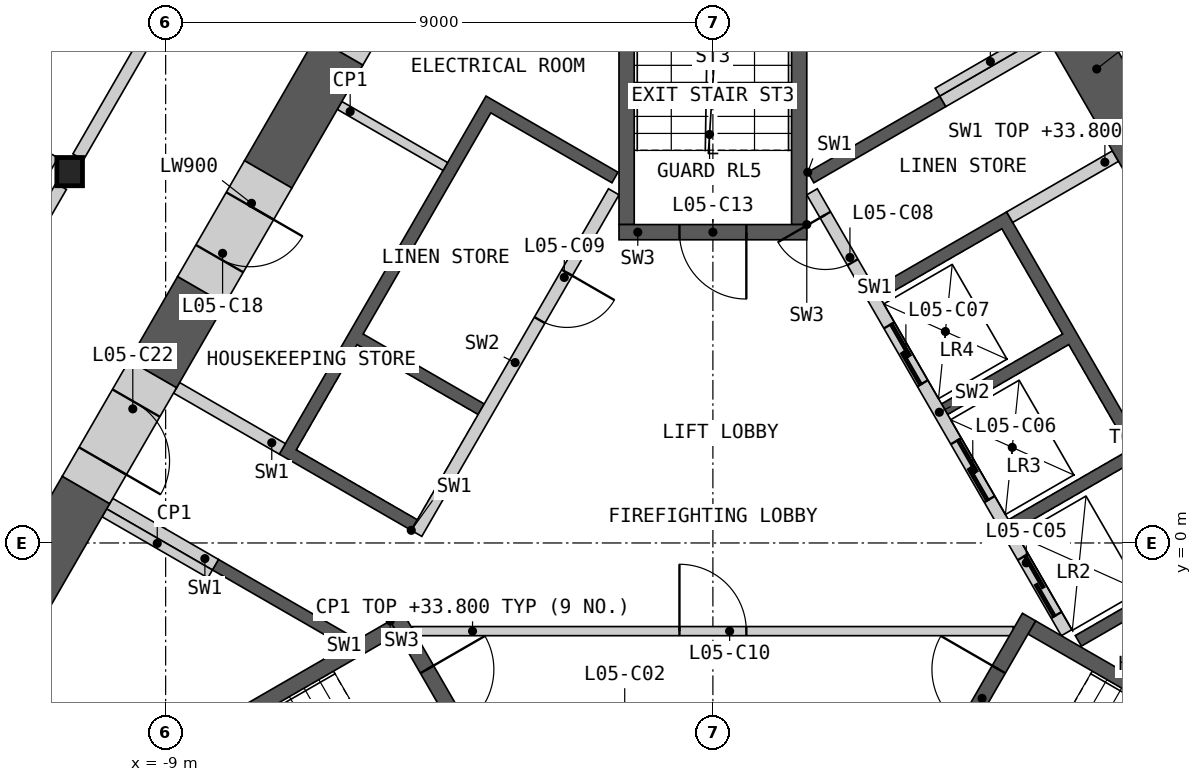
"""IFC4 building model, lengths in metres.
Left out: names, types, materials, properties, quantities, classifications, styles, units other than length and angle.
Written with IfcOpenShell. Run it as: python <this file> out.ifc"""

import sys

from ifc_helpers import new_model, si_unit, direction, frame, frame_2d, origin, origin_2d, place, context, subcontext, project, spatial, polyline, rectangle, i_section, outline, extrude, element, fill, save


model = new_model("IFC4")
c1 = context("Model", 3, precision=1e-05, world=origin(), true_north=direction((0.0, 1.0)))
c2 = subcontext(c1, "Body", "Model", "MODEL_VIEW")
j1 = project(units=[si_unit("LENGTHUNIT", "METRE"), si_unit("PLANEANGLEUNIT", "RADIAN")], contexts=[c1])
p1 = place(None, origin())
s1 = spatial("IfcSite", under=j1, at=p1, CompositionType="ELEMENT")
p2 = place(p1, origin())
s2 = spatial("IfcBuilding", under=s1, at=p2, CompositionType="ELEMENT")
p3 = place(p2, frame((0.0, 0.0, 30.0)))
s3 = spatial("IfcBuildingStorey", under=s2, at=p3, CompositionType="ELEMENT", Elevation=30.0)
p4 = place(p3, frame((-10.578, 6.107, 0.0), z_axis=(0.0, 0.0, 1.0), x_axis=(1.0, 0.0, 0.0)))
e1 = element("IfcColumn", 1, at=p4, inside=s3, PredefinedType="COLUMN", context=c2, shape_type="SweptSolid", body=[
    extrude(i_section(OverallWidth=0.421, OverallDepth=0.465, WebThickness=0.045, FlangeThickness=0.072, at=origin_2d()), origin(), (0.0, 0.0, 1.0), 4.2),
])
p5 = place(p3, origin())
e2 = element("IfcWall", 2, at=p5, inside=s3, PredefinedType="SHEAR", context=c2, shape_type="SweptSolid", body=[
    extrude(outline(polyline([(1.561, 6.097), (3.731, 7.35), (3.831, 7.177), (1.66, 5.924), (1.561, 6.097)])), origin(), (0.0, 0.0, 1.0), 3.8),
])
p6 = place(p3, origin())
e3 = element("IfcWall", 3, at=p6, inside=s3, PredefinedType="SHEAR", context=c2, shape_type="SweptSolid", body=[
    extrude(outline(polyline([(2.66, 4.192), (4.831, 5.445), (8.231, -0.444), (6.061, -1.697), (5.96, -1.524), (7.952, -0.374), (6.952, 1.358), (4.96, 0.208), (4.861, 0.381), (6.852, 1.531), (5.852, 3.263), (3.861, 2.113), (3.76, 2.287), (5.752, 3.437), (4.752, 5.169), (2.76, 4.019), (2.66, 4.192)])), origin(), (0.0, 0.0, 1.0), 3.8),
])
p7 = place(p3, frame((5.817, -1.476, 0.0), z_axis=(0.0, 0.0, 1.0), x_axis=(-0.500002616675, 0.866023893041, 0.0)))
e4 = element("IfcWall", 4, at=p7, inside=s3, PredefinedType="SOLIDWALL", context=c2, shape_type="SweptSolid", body=[
    extrude(rectangle(XDim=8.373, YDim=0.2, at=frame_2d((4.187, 0.0))), origin(), (0.0, 0.0, 1.0), 3.8),
])
p8 = place(p7, frame((0.337, 0.0, 0.0)))
e5 = element("IfcOpeningElement", 5, at=p8, cuts=e4, PredefinedType="OPENING", context=c2, shape_type="SweptSolid", body=[
    extrude(rectangle(XDim=1.1, YDim=2.1, at=frame_2d((0.55, 1.05))), frame((0.0, 0.11, 0.0), z_axis=(0.0, -1.0, 0.0), x_axis=(1.0, 0.0, 0.0)), (0.0, 0.0, 1.0), 0.22),
])
p9 = place(p7, frame((2.537, 0.0, 0.0)))
e6 = element("IfcOpeningElement", 6, at=p9, cuts=e4, PredefinedType="OPENING", context=c2, shape_type="SweptSolid", body=[
    extrude(rectangle(XDim=1.1, YDim=2.1, at=frame_2d((0.55, 1.05))), frame((0.0, 0.11, 0.0), z_axis=(0.0, -1.0, 0.0), x_axis=(1.0, 0.0, 0.0)), (0.0, 0.0, 1.0), 0.22),
])
p10 = place(p7, frame((4.737, 0.0, 0.0)))
e7 = element("IfcOpeningElement", 7, at=p10, cuts=e4, PredefinedType="OPENING", context=c2, shape_type="SweptSolid", body=[
    extrude(rectangle(XDim=1.1, YDim=2.1, at=frame_2d((0.55, 1.05))), frame((0.0, 0.11, 0.0), z_axis=(0.0, -1.0, 0.0), x_axis=(1.0, 0.0, 0.0)), (0.0, 0.0, 1.0), 0.22),
])
p11 = place(p7, frame((7.037, 0.0, 0.0)))
e8 = element("IfcOpeningElement", 8, at=p11, cuts=e4, PredefinedType="OPENING", context=c2, shape_type="SweptSolid", body=[
    extrude(rectangle(XDim=0.9, YDim=2.1, at=frame_2d((0.45, 1.05))), frame((0.0, 0.11, 0.0), z_axis=(0.0, -1.0, 0.0), x_axis=(1.0, 0.0, 0.0)), (0.0, 0.0, 1.0), 0.22),
])
p12 = place(p3, frame((4.881, 5.358, 0.0), z_axis=(0.0, 0.0, 1.0), x_axis=(0.866035824272, 0.499981950752, 0.0)))
e9 = element("IfcWall", 9, at=p12, inside=s3, PredefinedType="SHEAR", context=c2, shape_type="SweptSolid", body=[
    extrude(rectangle(XDim=2.009, YDim=0.2, at=frame_2d((1.004, 0.0))), origin(), (0.0, 0.0, 1.0), 3.8),
])
p13 = place(p3, frame((3.781, 7.263, 0.0), z_axis=(0.0, 0.0, 1.0), x_axis=(0.865983199114, 0.50007309351, 0.0)))
e10 = element("IfcWall", 10, at=p13, inside=s3, PredefinedType="SHEAR", context=c2, shape_type="SweptSolid", body=[
    extrude(rectangle(XDim=2.009, YDim=0.2, at=frame_2d((1.004, 0.0))), origin(), (0.0, 0.0, 1.0), 3.8),
])
p14 = place(p3, origin())
e11 = element("IfcWall", 11, at=p14, inside=s3, PredefinedType="SHEAR", context=c2, shape_type="SweptSolid", body=[
    extrude(outline(polyline([(-6.061, -1.697), (-8.231, -0.444), (-8.131, -0.271), (-5.96, -1.524), (-6.061, -1.697)])), origin(), (0.0, 0.0, 1.0), 3.8),
])
p15 = place(p3, origin())
e12 = element("IfcWall", 12, at=p15, inside=s3, PredefinedType="SHEAR", context=c2, shape_type="SweptSolid", body=[
    extrude(outline(polyline([(-4.96, 0.208), (-7.131, 1.461), (-3.731, 7.35), (-1.561, 6.097), (-1.66, 5.924), (-3.652, 7.074), (-5.752, 3.437), (-3.76, 2.287), (-3.861, 2.113), (-5.852, 3.263), (-6.852, 1.531), (-4.861, 0.381), (-4.96, 0.208)])), origin(), (0.0, 0.0, 1.0), 3.8),
])
p16 = place(p3, frame((-1.631, 5.776, 0.0), z_axis=(0.0, 0.0, 1.0), x_axis=(-0.499992876559, -0.866029516466, 0.0)))
e13 = element("IfcWall", 13, at=p16, inside=s3, PredefinedType="SOLIDWALL", context=c2, shape_type="SweptSolid", body=[
    extrude(rectangle(XDim=6.486, YDim=0.2, at=frame_2d((3.243, 0.0))), origin(), (0.0, 0.0, 1.0), 3.8),
])
p17 = place(p16, frame((1.537, 0.0, 0.0)))
e14 = element("IfcOpeningElement", 14, at=p17, cuts=e13, PredefinedType="OPENING", context=c2, shape_type="SweptSolid", body=[
    extrude(rectangle(XDim=0.9, YDim=2.1, at=frame_2d((0.45, 1.05))), frame((0.0, 0.11, 0.0), z_axis=(0.0, -1.0, 0.0), x_axis=(1.0, 0.0, 0.0)), (0.0, 0.0, 1.0), 0.22),
])
p18 = place(p3, frame((-7.081, 1.548, 0.0), z_axis=(0.0, 0.0, 1.0), x_axis=(-0.865983199114, 0.50007309351, 0.0)))
e15 = element("IfcWall", 15, at=p18, inside=s3, PredefinedType="SHEAR", context=c2, shape_type="SweptSolid", body=[
    extrude(rectangle(XDim=2.009, YDim=0.2, at=frame_2d((1.004, 0.0))), origin(), (0.0, 0.0, 1.0), 3.8),
])
p19 = place(p3, frame((-8.181, -0.357, 0.0), z_axis=(0.0, 0.0, 1.0), x_axis=(-0.866035824272, 0.499981950752, 0.0)))
e16 = element("IfcWall", 16, at=p19, inside=s3, PredefinedType="SHEAR", context=c2, shape_type="SweptSolid", body=[
    extrude(rectangle(XDim=2.009, YDim=0.2, at=frame_2d((1.004, 0.0))), origin(), (0.0, 0.0, 1.0), 3.8),
])
p20 = place(p3, frame((-4.941, -1.45, 0.0), z_axis=(0.0, 0.0, 1.0), x_axis=(1.0, 0.0, 0.0)))
e17 = element("IfcWall", 17, at=p20, inside=s3, PredefinedType="PARTITIONING", context=c2, shape_type="SweptSolid", body=[
    extrude(rectangle(XDim=9.882, YDim=0.15, at=frame_2d((4.941, 0.0))), origin(), (0.0, 0.0, 1.0), 3.8),
])
p21 = place(p20, frame((4.391, 0.0, 0.0)))
e18 = element("IfcOpeningElement", 18, at=p21, cuts=e17, PredefinedType="OPENING", context=c2, shape_type="SweptSolid", body=[
    extrude(rectangle(XDim=1.1, YDim=2.1, at=frame_2d((0.55, 1.05))), frame((0.0, 0.085, 0.0), z_axis=(0.0, -1.0, 0.0), x_axis=(1.0, 0.0, 0.0)), (0.0, 0.0, 1.0), 0.17),
])
p22 = place(p3, origin())
e19 = element("IfcWall", 19, at=p22, inside=s3, PredefinedType="SHEAR", context=c2, shape_type="SweptSolid", body=[
    extrude(outline(polyline([(-5.307, -1.281), (-10.374, -4.206), (-10.032, -4.298), (-5.182, -1.498), (-5.307, -1.281)])), origin(), (0.0, 0.0, 1.0), 3.8),
])
p23 = place(p3, frame((-5.199, -1.219, 0.0), z_axis=(0.0, 0.0, 1.0), x_axis=(0.499982516597, -0.866035497597, 0.0)))
e20 = element("IfcWall", 20, at=p23, inside=s3, PredefinedType="SHEAR", context=c2, shape_type="SweptSolid", body=[
    extrude(rectangle(XDim=3.088, YDim=0.25, at=frame_2d((1.544, 0.0))), origin(), (0.0, 0.0, 1.0), 3.8),
])
p24 = place(p23, frame((0.994, 0.0, 0.0)))
e21 = element("IfcOpeningElement", 21, at=p24, cuts=e20, PredefinedType="OPENING", context=c2, shape_type="SweptSolid", body=[
    extrude(rectangle(XDim=1.1, YDim=2.1, at=frame_2d((0.55, 1.05))), frame((0.0, 0.135, 0.0), z_axis=(0.0, -1.0, 0.0), x_axis=(1.0, 0.0, 0.0)), (0.0, 0.0, 1.0), 0.27),
])
p25 = place(p3, origin())
e22 = element("IfcWall", 22, at=p25, inside=s3, PredefinedType="SHEAR", context=c2, shape_type="SweptSolid", body=[
    extrude(outline(polyline([(10.032, -4.298), (10.374, -4.206), (5.307, -1.281), (5.182, -1.498), (10.032, -4.298)])), origin(), (0.0, 0.0, 1.0), 3.8),
])
p26 = place(p3, frame((3.655, -3.893, 0.0), z_axis=(0.0, 0.0, 1.0), x_axis=(0.499982516597, 0.866035497597, 0.0)))
e23 = element("IfcWall", 23, at=p26, inside=s3, PredefinedType="SHEAR", context=c2, shape_type="SweptSolid", body=[
    extrude(rectangle(XDim=3.088, YDim=0.25, at=frame_2d((1.544, 0.0))), origin(), (0.0, 0.0, 1.0), 3.8),
])
p27 = place(p26, frame((0.994, 0.0, 0.0)))
e24 = element("IfcOpeningElement", 24, at=p27, cuts=e23, PredefinedType="OPENING", context=c2, shape_type="SweptSolid", body=[
    extrude(rectangle(XDim=1.1, YDim=2.1, at=frame_2d((0.55, 1.05))), frame((0.0, 0.135, 0.0), z_axis=(0.0, -1.0, 0.0), x_axis=(1.0, 0.0, 0.0)), (0.0, 0.0, 1.0), 0.27),
])
p28 = place(p3, origin())
e25 = element("IfcWall", 25, at=p28, inside=s3, PredefinedType="SHEAR", context=c2, shape_type="SweptSolid", body=[
    extrude(outline(polyline([(1.544, 5.237), (1.544, 11.087), (1.294, 10.837), (1.294, 5.237), (1.544, 5.237)])), origin(), (0.0, 0.0, 1.0), 3.8),
])
p29 = place(p3, origin())
e26 = element("IfcWall", 26, at=p29, inside=s3, PredefinedType="SHEAR", context=c2, shape_type="SweptSolid", body=[
    extrude(outline(polyline([(-1.294, 10.837), (-1.544, 11.087), (-1.544, 5.237), (-1.294, 5.237), (-1.294, 10.837)])), origin(), (0.0, 0.0, 1.0), 3.8),
])
p30 = place(p3, frame((1.544, 5.112, 0.0), z_axis=(0.0, 0.0, 1.0), x_axis=(-1.0, 0.0, 0.0)))
e27 = element("IfcWall", 27, at=p30, inside=s3, PredefinedType="SHEAR", context=c2, shape_type="SweptSolid", body=[
    extrude(rectangle(XDim=3.088, YDim=0.25, at=frame_2d((1.544, 0.0))), origin(), (0.0, 0.0, 1.0), 3.8),
])
p31 = place(p30, frame((0.994, 0.0, 0.0)))
e28 = element("IfcOpeningElement", 28, at=p31, cuts=e27, PredefinedType="OPENING", context=c2, shape_type="SweptSolid", body=[
    extrude(rectangle(XDim=1.1, YDim=2.1, at=frame_2d((0.55, 1.05))), frame((0.0, 0.135, 0.0), z_axis=(0.0, -1.0, 0.0), x_axis=(1.0, 0.0, 0.0)), (0.0, 0.0, 1.0), 0.27),
])
for number, where, z_axis, x_axis in (
    (29, (3.693, 7.415, 0.0), (0.0, 0.0, 1.0), (0.866, 0.5, 0.0)),
    (30, (-8.268, -0.509, 0.0), (0.0, 0.0, 1.0), (-0.866, 0.5, 0.0)),
    (31, (-6.139, 7.196, 0.0), (0.0, 0.0, 1.0), (0.866, -0.5, 0.0)),
):
    element("IfcWall", number, at=place(p3, frame(where, z_axis=z_axis, x_axis=x_axis)), inside=s3, PredefinedType="PARTITIONING", context=c2, shape_type="SweptSolid", body=[
        extrude(rectangle(XDim=2.009, YDim=0.15, at=frame_2d((1.004, 0.0))), origin(), (0.0, 0.0, 1.0), 3.8),
    ])
p32 = place(p3, frame((8.16, 4.596, 0.0), z_axis=(0.0, 0.0, 1.0), x_axis=(-0.500012259336, 0.866018325738, 0.0)))
e32 = element("IfcWall", 32, at=p32, inside=s3, PredefinedType="SHEAR", context=c2, shape_type="SweptSolid", body=[
    extrude(rectangle(XDim=7.389, YDim=0.9, at=frame_2d((3.695, 0.0))), origin(), (0.0, 0.0, 1.0), 3.8),
])
p33 = place(p3, frame((-10.31, 0.872, 0.0), z_axis=(0.0, 0.0, 1.0), x_axis=(-0.499946751862, -0.866056144429, 0.0)))
e33 = element("IfcWall", 33, at=p33, inside=s3, PredefinedType="SHEAR", context=c2, shape_type="SweptSolid", body=[
    extrude(rectangle(XDim=2.889, YDim=0.9, at=frame_2d((1.445, 0.0))), origin(), (0.0, 0.0, 1.0), 3.8),
])
p34 = place(p3, frame((-6.145, 8.086, 0.0), z_axis=(0.0, 0.0, 1.0), x_axis=(-0.500026924946, -0.866009858102, 0.0)))
e34 = element("IfcWall", 34, at=p34, inside=s3, PredefinedType="SHEAR", context=c2, shape_type="SweptSolid", body=[
    extrude(rectangle(XDim=2.337, YDim=0.9, at=frame_2d((1.168, 0.0))), origin(), (0.0, 0.0, 1.0), 3.8),
])
p35 = place(p3, frame((-8.413, 4.157, 0.0), z_axis=(0.0, 0.0, 1.0), x_axis=(-0.499961121316, -0.86604784924, 0.0)))
e35 = element("IfcWall", 35, at=p35, inside=s3, PredefinedType="SHEAR", context=c2, shape_type="SweptSolid", body=[
    extrude(rectangle(XDim=1.594, YDim=0.9, at=frame_2d((0.797, 0.0))), origin(), (0.0, 0.0, 1.0), 3.8),
])
p36 = place(p3, frame((-7.313, 6.062, 0.0), z_axis=(0.0, 0.0, 1.0), x_axis=(-0.500077893725, -0.86598042715, 0.0)))
e36 = element("IfcWall", 36, at=p36, inside=s3, PredefinedType="SHEAR", context=c2, shape_type="SweptSolid", body=[
    extrude(rectangle(XDim=2.2, YDim=0.9, at=frame_2d((1.1, 0.0))), origin(), (0.0, 0.0, 1.0), 3.8),
])
p37 = place(p36, frame((0.6, 0.0, 0.0)))
e37 = element("IfcOpeningElement", 37, at=p37, cuts=e36, PredefinedType="OPENING", context=c2, shape_type="SweptSolid", body=[
    extrude(rectangle(XDim=1.0, YDim=2.1, at=frame_2d((0.5, 1.05))), frame((0.0, 0.46, 0.0), z_axis=(0.0, -1.0, 0.0), x_axis=(1.0, 0.0, 0.0)), (0.0, 0.0, 1.0), 0.92),
])
p38 = place(p3, frame((-5.045, 9.992, 0.0), z_axis=(0.0, 0.0, 1.0), x_axis=(-0.499898558967, -0.866083962871, 0.0)))
e38 = element("IfcWall", 38, at=p38, inside=s3, PredefinedType="SHEAR", context=c2, shape_type="SweptSolid", body=[
    extrude(rectangle(XDim=2.2, YDim=0.9, at=frame_2d((1.1, 0.0))), origin(), (0.0, 0.0, 1.0), 3.8),
])
p39 = place(p38, frame((0.6, 0.0, 0.0)))
e39 = element("IfcOpeningElement", 39, at=p39, cuts=e38, PredefinedType="OPENING", context=c2, shape_type="SweptSolid", body=[
    extrude(rectangle(XDim=1.0, YDim=2.1, at=frame_2d((0.5, 1.05))), frame((0.0, 0.46, 0.0), z_axis=(0.0, -1.0, 0.0), x_axis=(1.0, 0.0, 0.0)), (0.0, 0.0, 1.0), 0.92),
])
p40 = place(p3, frame((-9.21, 2.777, 0.0), z_axis=(0.0, 0.0, 1.0), x_axis=(-0.500077893725, -0.86598042715, 0.0)))
e40 = element("IfcWall", 40, at=p40, inside=s3, PredefinedType="SHEAR", context=c2, shape_type="SweptSolid", body=[
    extrude(rectangle(XDim=2.2, YDim=0.9, at=frame_2d((1.1, 0.0))), origin(), (0.0, 0.0, 1.0), 3.8),
])
p41 = place(p40, frame((0.55, 0.0, 0.0)))
e41 = element("IfcOpeningElement", 41, at=p41, cuts=e40, PredefinedType="OPENING", context=c2, shape_type="SweptSolid", body=[
    extrude(rectangle(XDim=1.1, YDim=2.1, at=frame_2d((0.55, 1.05))), frame((0.0, 0.46, 0.0), z_axis=(0.0, -1.0, 0.0), x_axis=(1.0, 0.0, 0.0)), (0.0, 0.0, 1.0), 0.92),
])
p42 = place(p3, frame((5.429, 15.026, 0.0), z_axis=(0.0, 0.0, 1.0), x_axis=(0.50001002959, -0.86601961312, 0.0)))
e42 = element("IfcWall", 42, at=p42, inside=s3, PredefinedType="PARTITIONING", context=c2, shape_type="SweptSolid", body=[
    extrude(rectangle(XDim=10.019, YDim=0.2, at=frame_2d((5.009, 0.0))), origin(), (0.0, 0.0, 1.0), 3.8),
])
p43 = place(p42, frame((7.266, 0.0, 0.0)))
e43 = element("IfcOpeningElement", 43, at=p43, cuts=e42, PredefinedType="OPENING", context=c2, shape_type="SweptSolid", body=[
    extrude(rectangle(XDim=1.0, YDim=2.1, at=frame_2d((0.5, 1.05))), frame((0.0, 0.11, 0.0), z_axis=(0.0, -1.0, 0.0), x_axis=(1.0, 0.0, 0.0)), (0.0, 0.0, 1.0), 0.22),
])
p44 = place(p42, frame((2.254, 0.0, 0.0)))
e44 = element("IfcOpeningElement", 44, at=p44, cuts=e42, PredefinedType="OPENING", context=c2, shape_type="SweptSolid", body=[
    extrude(rectangle(XDim=1.0, YDim=2.1, at=frame_2d((0.5, 1.05))), frame((0.0, 0.11, 0.0), z_axis=(0.0, -1.0, 0.0), x_axis=(1.0, 0.0, 0.0)), (0.0, 0.0, 1.0), 0.22),
])
p45 = place(p3, frame((-10.439, 6.35, 0.0), z_axis=(0.0, 0.0, 1.0), x_axis=(0.50001002959, 0.86601961312, 0.0)))
e45 = element("IfcWall", 45, at=p45, inside=s3, PredefinedType="PARTITIONING", context=c2, shape_type="SweptSolid", body=[
    extrude(rectangle(XDim=10.019, YDim=0.2, at=frame_2d((5.009, 0.0))), origin(), (0.0, 0.0, 1.0), 3.8),
])
p46 = place(p45, frame((4.16, 0.0, 0.0)))
e46 = element("IfcOpeningElement", 46, at=p46, cuts=e45, PredefinedType="OPENING", context=c2, shape_type="SweptSolid", body=[
    extrude(rectangle(XDim=1.8, YDim=2.1, at=frame_2d((0.9, 1.05))), frame((0.0, 0.11, 0.0), z_axis=(0.0, -1.0, 0.0), x_axis=(1.0, 0.0, 0.0)), (0.0, 0.0, 1.0), 0.22),
])
p47 = place(p3, frame((-15.728, -2.811, 0.0), z_axis=(0.0, 0.0, 1.0), x_axis=(0.49999175339, 0.866030164915, 0.0)))
e47 = element("IfcWall", 47, at=p47, inside=s3, PredefinedType="PARTITIONING", context=c2, shape_type="SweptSolid", body=[
    extrude(rectangle(XDim=10.019, YDim=0.2, at=frame_2d((5.009, 0.0))), origin(), (0.0, 0.0, 1.0), 3.8),
])
p48 = place(p47, frame((4.484, 0.0, 0.0)))
e48 = element("IfcOpeningElement", 48, at=p48, cuts=e47, PredefinedType="OPENING", context=c2, shape_type="SweptSolid", body=[
    extrude(rectangle(XDim=0.95, YDim=2.1, at=frame_2d((0.475, 1.05))), frame((0.0, 0.11, 0.0), z_axis=(0.0, -1.0, 0.0), x_axis=(1.0, 0.0, 0.0)), (0.0, 0.0, 1.0), 0.22),
])
p49 = place(p3, frame((-21.947, 12.671, 0.0), z_axis=(0.0, 0.0, 1.0), x_axis=(0.866026729935, -0.499997703033, 0.0)))
e49 = element("IfcWall", 49, at=p49, inside=s3, PredefinedType="PARTITIONING", context=c2, shape_type="SweptSolid", body=[
    extrude(rectangle(XDim=12.848, YDim=0.2, at=frame_2d((6.424, 0.0))), origin(), (0.0, 0.0, 1.0), 2.885),
])
p50 = place(p8, origin())
e50 = element("IfcDoor", 50, at=p50, inside=s3, OperationType="SLIDING_TO_LEFT", PredefinedType="DOOR", context=c2, shape_type="SweptSolid", body=[
    extrude(rectangle(XDim=1.1, YDim=2.1, at=frame_2d((0.55, 1.05))), frame((0.0, 0.025, 0.0), z_axis=(0.0, -1.0, 0.0), x_axis=(1.0, 0.0, 0.0)), (0.0, 0.0, 1.0), 0.05),
])
fill(e5, e50)
p51 = place(p9, origin())
e51 = element("IfcDoor", 51, at=p51, inside=s3, OperationType="SLIDING_TO_LEFT", PredefinedType="DOOR", context=c2, shape_type="SweptSolid", body=[
    extrude(rectangle(XDim=1.1, YDim=2.1, at=frame_2d((0.55, 1.05))), frame((0.0, 0.025, 0.0), z_axis=(0.0, -1.0, 0.0), x_axis=(1.0, 0.0, 0.0)), (0.0, 0.0, 1.0), 0.05),
])
fill(e6, e51)
p52 = place(p10, origin())
e52 = element("IfcDoor", 52, at=p52, inside=s3, OperationType="SLIDING_TO_LEFT", PredefinedType="DOOR", context=c2, shape_type="SweptSolid", body=[
    extrude(rectangle(XDim=1.1, YDim=2.1, at=frame_2d((0.55, 1.05))), frame((0.0, 0.025, 0.0), z_axis=(0.0, -1.0, 0.0), x_axis=(1.0, 0.0, 0.0)), (0.0, 0.0, 1.0), 0.05),
])
fill(e7, e52)
p53 = place(p11, origin())
e53 = element("IfcDoor", 53, at=p53, inside=s3, OperationType="SINGLE_SWING_RIGHT", PredefinedType="DOOR", context=c2, shape_type="SweptSolid", body=[
    extrude(rectangle(XDim=0.9, YDim=2.1, at=frame_2d((0.45, 1.05))), frame((0.0, 0.025, 0.0), z_axis=(0.0, -1.0, 0.0), x_axis=(1.0, 0.0, 0.0)), (0.0, 0.0, 1.0), 0.05),
])
fill(e8, e53)
p54 = place(p17, origin())
e54 = element("IfcDoor", 54, at=p54, inside=s3, OperationType="SINGLE_SWING_LEFT", PredefinedType="DOOR", context=c2, shape_type="SweptSolid", body=[
    extrude(rectangle(XDim=0.9, YDim=2.1, at=frame_2d((0.45, 1.05))), frame((0.0, 0.025, 0.0), z_axis=(0.0, -1.0, 0.0), x_axis=(1.0, 0.0, 0.0)), (0.0, 0.0, 1.0), 0.05),
])
fill(e14, e54)
p55 = place(p21, origin())
e55 = element("IfcDoor", 55, at=p55, inside=s3, OperationType="SINGLE_SWING_LEFT", PredefinedType="DOOR", context=c2, shape_type="SweptSolid", body=[
    extrude(rectangle(XDim=1.1, YDim=2.1, at=frame_2d((0.55, 1.05))), frame((0.0, 0.025, 0.0), z_axis=(0.0, -1.0, 0.0), x_axis=(1.0, 0.0, 0.0)), (0.0, 0.0, 1.0), 0.05),
])
fill(e18, e55)
p56 = place(p24, origin())
e56 = element("IfcDoor", 56, at=p56, inside=s3, OperationType="SINGLE_SWING_LEFT", PredefinedType="DOOR", context=c2, shape_type="SweptSolid", body=[
    extrude(rectangle(XDim=1.1, YDim=2.1, at=frame_2d((0.55, 1.05))), frame((0.0, 0.025, 0.0), z_axis=(0.0, -1.0, 0.0), x_axis=(1.0, 0.0, 0.0)), (0.0, 0.0, 1.0), 0.05),
])
fill(e21, e56)
p57 = place(p27, origin())
e57 = element("IfcDoor", 57, at=p57, inside=s3, OperationType="SINGLE_SWING_RIGHT", PredefinedType="DOOR", context=c2, shape_type="SweptSolid", body=[
    extrude(rectangle(XDim=1.1, YDim=2.1, at=frame_2d((0.55, 1.05))), frame((0.0, 0.025, 0.0), z_axis=(0.0, -1.0, 0.0), x_axis=(1.0, 0.0, 0.0)), (0.0, 0.0, 1.0), 0.05),
])
fill(e24, e57)
p58 = place(p31, origin())
e58 = element("IfcDoor", 58, at=p58, inside=s3, OperationType="SINGLE_SWING_LEFT", PredefinedType="DOOR", context=c2, shape_type="SweptSolid", body=[
    extrude(rectangle(XDim=1.1, YDim=2.1, at=frame_2d((0.55, 1.05))), frame((0.0, 0.025, 0.0), z_axis=(0.0, -1.0, 0.0), x_axis=(1.0, 0.0, 0.0)), (0.0, 0.0, 1.0), 0.05),
])
fill(e28, e58)
p59 = place(p37, origin())
e59 = element("IfcDoor", 59, at=p59, inside=s3, OperationType="SINGLE_SWING_LEFT", PredefinedType="DOOR", context=c2, shape_type="SweptSolid", body=[
    extrude(rectangle(XDim=1.0, YDim=2.1, at=frame_2d((0.5, 1.05))), frame((0.0, 0.205, 0.0), z_axis=(0.0, -1.0, 0.0), x_axis=(1.0, 0.0, 0.0)), (0.0, 0.0, 1.0), 0.05),
])
fill(e37, e59)
p60 = place(p41, origin())
e60 = element("IfcDoor", 60, at=p60, inside=s3, OperationType="SINGLE_SWING_RIGHT", PredefinedType="DOOR", context=c2, shape_type="SweptSolid", body=[
    extrude(rectangle(XDim=1.1, YDim=2.1, at=frame_2d((0.55, 1.05))), frame((0.0, 0.205, 0.0), z_axis=(0.0, -1.0, 0.0), x_axis=(1.0, 0.0, 0.0)), (0.0, 0.0, 1.0), 0.05),
])
fill(e41, e60)
save(model, sys.argv[1])
